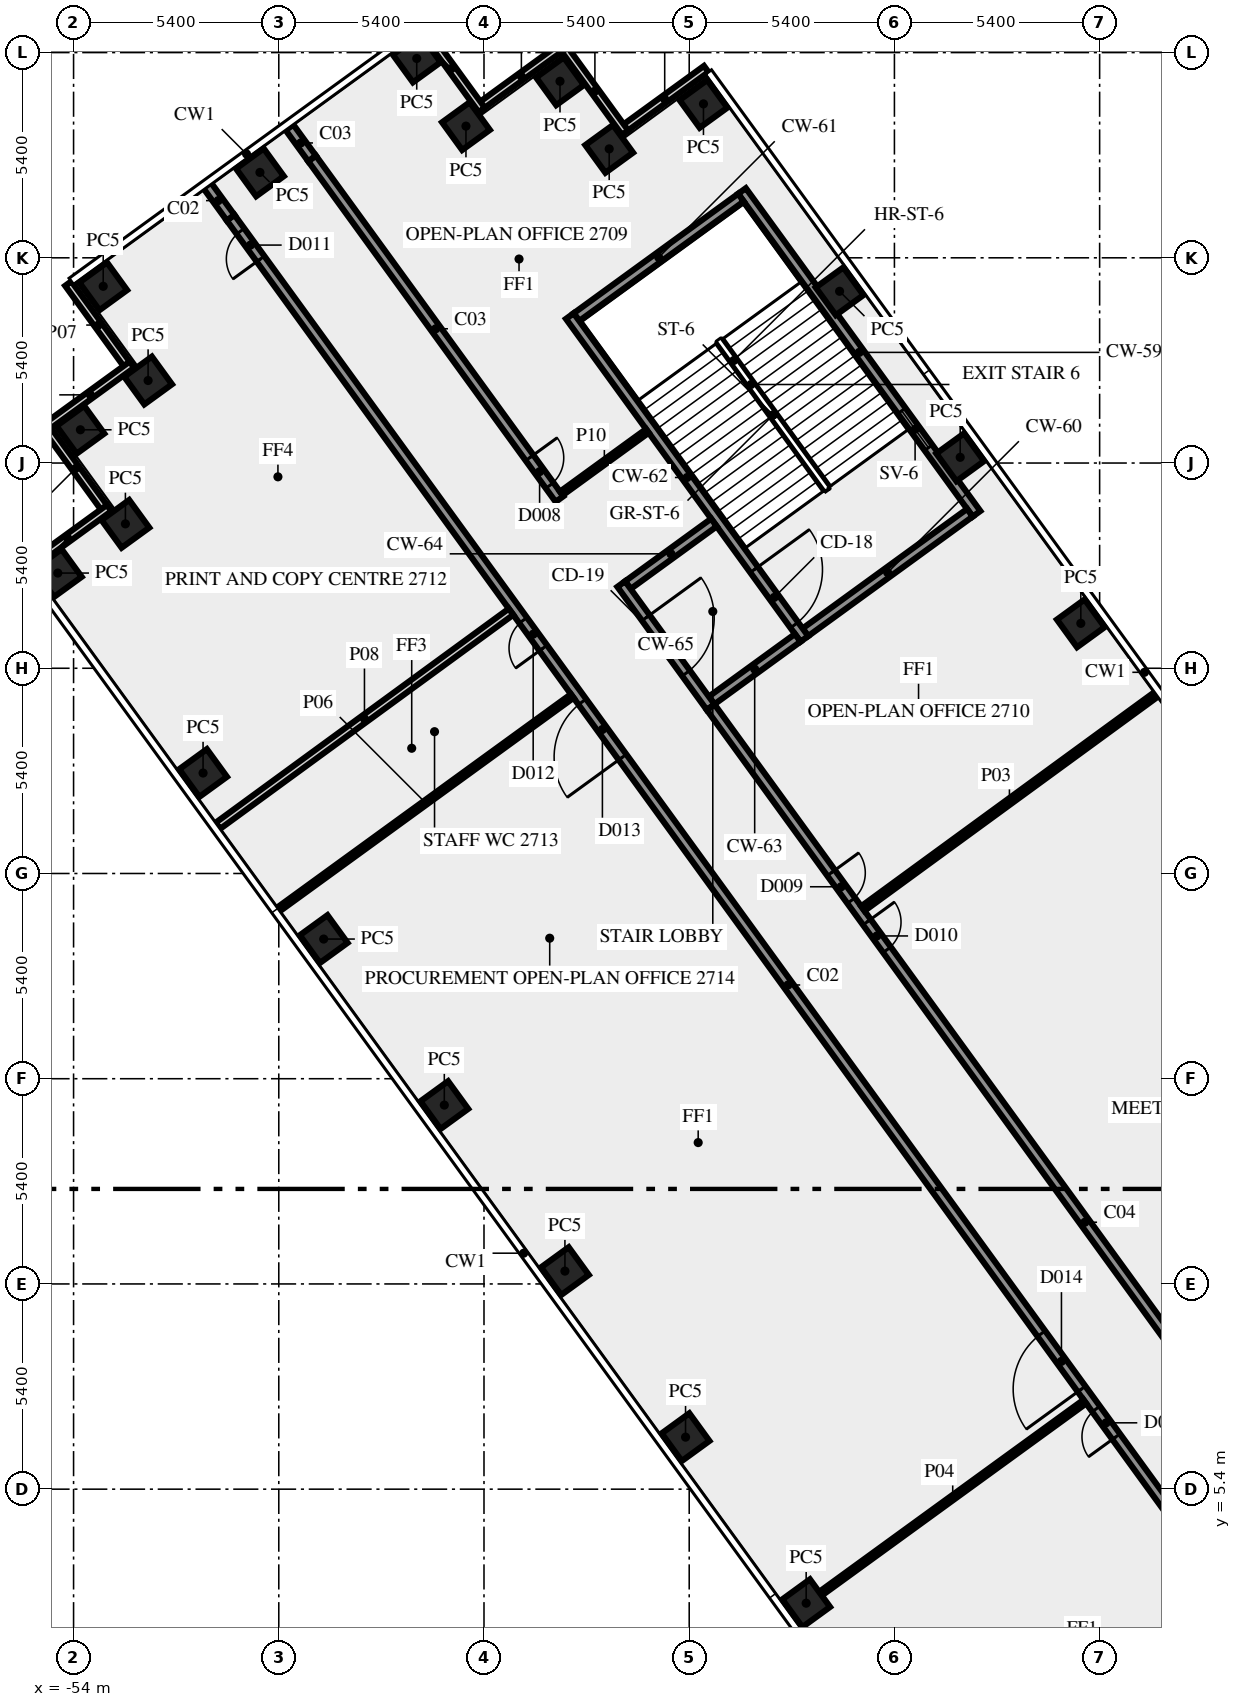
"""IFC4 building model, lengths in metres.
Left out: names, types, materials, properties, quantities, classifications, styles, units other than length and angle.
Written with IfcOpenShell. Run it as: python <this file> out.ifc"""

import sys

from ifc_helpers import new_model, si_unit, direction, frame, frame_2d, origin, origin_2d, place, context, subcontext, project, spatial, rectangle, extrude, element, fill, save


model = new_model("IFC4")
c1 = context("Model", 3, precision=1e-05, world=origin(), true_north=direction((0.0, 1.0)))
c2 = subcontext(c1, "Body", "Model", "MODEL_VIEW")
j1 = project(units=[si_unit("LENGTHUNIT", "METRE"), si_unit("PLANEANGLEUNIT", "RADIAN")], contexts=[c1])
p1 = place(None, origin())
s1 = spatial("IfcSite", under=j1, at=p1, CompositionType="ELEMENT")
p2 = place(p1, origin())
s2 = spatial("IfcBuilding", under=s1, at=p2, CompositionType="ELEMENT")
p3 = place(p2, frame((0.0, 0.0, 117.0)))
s3 = spatial("IfcBuildingStorey", under=s2, at=p3, CompositionType="ELEMENT", Elevation=117.0)
for number, where, z_axis, x_axis in (
    (1, (-27.495, 28.181, 0.0), (0.0, 0.0, 1.0), (-0.588, 0.809, 0.0)),
    (2, (-30.669, 32.55, 0.0), (0.0, 0.0, 1.0), (-0.588, 0.809, 0.0)),
    (3, (-33.843, 36.919, 0.0), (0.0, 0.0, 1.0), (-0.588, 0.809, 0.0)),
    (4, (-37.425, 41.85, 0.0), (0.0, 0.0, 1.0), (-0.588, 0.809, 0.0)),
    (5, (-39.906, 40.666, 0.0), (0.0, 0.0, 1.0), (-0.588, 0.809, 0.0)),
    (6, (-41.2, 42.445, 0.0), (0.0, 0.0, 1.0), (-0.588, 0.809, 0.0)),
    (7, (-43.675, 41.265, 0.0), (0.0, 0.0, 1.0), (-0.809, -0.588, 0.0)),
    (8, (-44.97, 43.045, 0.0), (0.0, 0.0, 1.0), (-0.809, -0.588, 0.0)),
    (9, (-49.096, 40.047, 0.0), (0.0, 0.0, 1.0), (-0.809, -0.588, 0.0)),
    (10, (-53.22, 37.05, 0.0), (0.0, 0.0, 1.0), (0.588, -0.809, 0.0)),
    (11, (-52.039, 34.571, 0.0), (0.0, 0.0, 1.0), (-0.809, -0.588, 0.0)),
    (12, (-53.82, 33.275, 0.0), (0.0, 0.0, 1.0), (0.588, -0.809, 0.0)),
    (13, (-52.636, 30.8, 0.0), (0.0, 0.0, 1.0), (-0.809, -0.588, 0.0)),
    (14, (-54.415, 29.505, 0.0), (0.0, 0.0, 1.0), (0.588, -0.809, 0.0)),
    (15, (-50.592, 24.243, 0.0), (0.0, 0.0, 1.0), (0.588, -0.809, 0.0)),
    (16, (-47.418, 19.875, 0.0), (0.0, 0.0, 1.0), (0.588, -0.809, 0.0)),
    (17, (-44.244, 15.506, 0.0), (0.0, 0.0, 1.0), (0.588, -0.809, 0.0)),
    (18, (-41.07, 11.137, 0.0), (0.0, 0.0, 1.0), (0.588, -0.809, 0.0)),
    (19, (-37.896, 6.769, 0.0), (0.0, 0.0, 1.0), (0.588, -0.809, 0.0)),
    (20, (-34.722, 2.4, 0.0), (0.0, 0.0, 1.0), (0.588, -0.809, 0.0)),
):
    element("IfcColumn", number, at=place(p3, frame(where, z_axis=z_axis, x_axis=x_axis)), inside=s3, PredefinedType="COLUMN", context=c2, shape_type="SweptSolid", body=[
        extrude(rectangle(XDim=0.9, YDim=0.9, at=origin_2d()), origin(), (0.0, 0.0, 1.0), 3.65),
    ])
p4 = place(p3, frame((-37.353, 42.768, 0.0), z_axis=(0.0, 0.0, 1.0), x_axis=(-0.809033161865, -0.587762999008, 0.0)))
e21 = element("IfcWall", 21, at=p4, inside=s3, PredefinedType="SOLIDWALL", context=c2, shape_type="SweptSolid", body=[
    extrude(rectangle(XDim=2.7, YDim=0.2, at=frame_2d((1.35, 0.0))), origin(), (0.0, 0.0, 1.0), 3.65),
])
p5 = place(p3, frame((-39.488, 41.094, 0.0), z_axis=(0.0, 0.0, 1.0), x_axis=(-0.587806000234, 0.809001919707, 0.0)))
e22 = element("IfcWall", 22, at=p5, inside=s3, PredefinedType="SOLIDWALL", context=c2, shape_type="SweptSolid", body=[
    extrude(rectangle(XDim=2.7, YDim=0.2, at=frame_2d((1.35, 0.0))), origin(), (0.0, 0.0, 1.0), 3.65),
])
for number, where, z_axis, x_axis in (
    (23, (-41.124, 43.366, 0.0), (0.0, 0.0, 1.0), (-0.809, -0.588, 0.0)),
    (24, (-43.259, 41.691, 0.0), (0.0, 0.0, 1.0), (-0.588, 0.809, 0.0)),
    (25, (-54.14, 37.123, 0.0), (0.0, 0.0, 1.0), (0.588, -0.809, 0.0)),
    (26, (-52.465, 34.987, 0.0), (0.0, 0.0, 1.0), (-0.809, -0.588, 0.0)),
):
    element("IfcWall", number, at=place(p3, frame(where, z_axis=z_axis, x_axis=x_axis)), inside=s3, PredefinedType="SOLIDWALL", context=c2, shape_type="SweptSolid", body=[
        extrude(rectangle(XDim=2.7, YDim=0.2, at=frame_2d((1.35, 0.0))), origin(), (0.0, 0.0, 1.0), 3.65),
    ])
p6 = place(p3, frame((-54.738, 33.351, 0.0), z_axis=(0.0, 0.0, 1.0), x_axis=(0.587779184282, -0.809021403008, 0.0)))
e27 = element("IfcWall", 27, at=p6, inside=s3, PredefinedType="SOLIDWALL", context=c2, shape_type="SweptSolid", body=[
    extrude(rectangle(XDim=2.7, YDim=0.2, at=frame_2d((1.35, 0.0))), origin(), (0.0, 0.0, 1.0), 3.65),
])
p7 = place(p3, frame((-53.063, 31.216, 0.0), z_axis=(0.0, 0.0, 1.0), x_axis=(-0.809033161865, -0.587762999008, 0.0)))
e28 = element("IfcWall", 28, at=p7, inside=s3, PredefinedType="SOLIDWALL", context=c2, shape_type="SweptSolid", body=[
    extrude(rectangle(XDim=2.7, YDim=0.2, at=frame_2d((1.35, 0.0))), origin(), (0.0, 0.0, 1.0), 3.65),
])
p8 = place(p3, frame((-30.24, 31.064, 0.0), z_axis=(0.0, 0.0, 1.0), x_axis=(-0.587795589702, 0.809009483706, 0.0)))
e29 = element("IfcWall", 29, at=p8, inside=s3, PredefinedType="SHEAR", context=c2, shape_type="SweptSolid", body=[
    extrude(rectangle(XDim=10.5, YDim=0.25, at=frame_2d((5.25, 0.0))), origin(), (0.0, 0.0, 1.0), 3.65),
])
p9 = place(p8, frame((2.15, 0.0, 1.0)))
e30 = element("IfcOpeningElement", 30, at=p9, cuts=e29, PredefinedType="OPENING", context=c2, shape_type="SweptSolid", body=[
    extrude(rectangle(XDim=1.2, YDim=1.2, at=frame_2d((0.6, 0.6))), frame((0.0, 0.135, 0.0), z_axis=(0.0, -1.0, 0.0), x_axis=(1.0, 0.0, 0.0)), (0.0, 0.0, 1.0), 0.27),
])
p10 = place(p3, frame((-30.414, 31.092, 0.0), z_axis=(0.0, 0.0, 1.0), x_axis=(-0.8089984606, -0.587810760999, 0.0)))
e31 = element("IfcWall", 31, at=p10, inside=s3, PredefinedType="SHEAR", context=c2, shape_type="SweptSolid", body=[
    extrude(rectangle(XDim=5.35, YDim=0.25, at=frame_2d((2.675, 0.0))), origin(), (0.0, 0.0, 1.0), 3.65),
])
p11 = place(p3, frame((-36.439, 39.384, 0.0), z_axis=(0.0, 0.0, 1.0), x_axis=(-0.809020161303, -0.587780893365, 0.0)))
e32 = element("IfcWall", 32, at=p11, inside=s3, PredefinedType="SHEAR", context=c2, shape_type="SweptSolid", body=[
    extrude(rectangle(XDim=5.35, YDim=0.25, at=frame_2d((2.675, 0.0))), origin(), (0.0, 0.0, 1.0), 3.65),
])
p12 = place(p3, frame((-40.942, 36.267, 0.0), z_axis=(0.0, 0.0, 1.0), x_axis=(0.587795589702, -0.809009483706, 0.0)))
e33 = element("IfcWall", 33, at=p12, inside=s3, PredefinedType="SHEAR", context=c2, shape_type="SweptSolid", body=[
    extrude(rectangle(XDim=10.5, YDim=0.25, at=frame_2d((5.25, 0.0))), origin(), (0.0, 0.0, 1.0), 3.65),
])
p13 = place(p12, frame((8.25, 0.0, 0.0)))
e34 = element("IfcOpeningElement", 34, at=p13, cuts=e33, PredefinedType="OPENING", context=c2, shape_type="SweptSolid", body=[
    extrude(rectangle(XDim=1.8, YDim=2.1, at=frame_2d((0.9, 1.05))), frame((0.0, 0.135, 0.0), z_axis=(0.0, -1.0, 0.0), x_axis=(1.0, 0.0, 0.0)), (0.0, 0.0, 1.0), 0.27),
])
for number, where, z_axis, x_axis in (
    (35, (-34.945, 27.8, 0.0), (0.0, 0.0, 1.0), (-0.809, -0.588, 0.0)),
    (36, (-37.149, 30.834, 0.0), (0.0, 0.0, 1.0), (-0.809, -0.588, 0.0)),
):
    element("IfcWall", number, at=place(p3, frame(where, z_axis=z_axis, x_axis=x_axis)), inside=s3, PredefinedType="SHEAR", context=c2, shape_type="SweptSolid", body=[
        extrude(rectangle(XDim=2.8, YDim=0.25, at=frame_2d((1.4, 0.0))), origin(), (0.0, 0.0, 1.0), 3.65),
    ])
p14 = place(p3, frame((-39.589, 29.216, 0.0), z_axis=(0.0, 0.0, 1.0), x_axis=(0.587772420479, -0.809026317077, 0.0)))
e37 = element("IfcWall", 37, at=p14, inside=s3, PredefinedType="SHEAR", context=c2, shape_type="SweptSolid", body=[
    extrude(rectangle(XDim=4.0, YDim=0.25, at=frame_2d((2.0, 0.0))), origin(), (0.0, 0.0, 1.0), 3.65),
])
p15 = place(p14, frame((1.1, 0.0, 0.0)))
e38 = element("IfcOpeningElement", 38, at=p15, cuts=e37, PredefinedType="OPENING", context=c2, shape_type="SweptSolid", body=[
    extrude(rectangle(XDim=1.8, YDim=2.1, at=frame_2d((0.9, 1.05))), frame((0.0, 0.135, 0.0), z_axis=(0.0, -1.0, 0.0), x_axis=(1.0, 0.0, 0.0)), (0.0, 0.0, 1.0), 0.27),
])
p16 = place(p3, frame((-20.531, -1.523, 0.0), z_axis=(0.0, 0.0, 1.0), x_axis=(-0.587784522481, 0.809017524614, 0.0)))
e39 = element("IfcWall", 39, at=p16, inside=s3, PredefinedType="SOLIDWALL", context=c2, shape_type="SweptSolid", body=[
    extrude(rectangle(XDim=49.912, YDim=0.25, at=frame_2d((24.956, 0.0))), origin(), (0.0, 0.0, 1.0), 3.65),
])
p17 = place(p16, frame((10.266, 0.0, 0.0)))
e40 = element("IfcOpeningElement", 40, at=p17, cuts=e39, PredefinedType="OPENING", context=c2, shape_type="SweptSolid", body=[
    extrude(rectangle(XDim=0.9, YDim=2.1, at=frame_2d((0.45, 1.05))), frame((0.0, 0.135, 0.0), z_axis=(0.0, -1.0, 0.0), x_axis=(1.0, 0.0, 0.0)), (0.0, 0.0, 1.0), 0.27),
])
p18 = place(p16, frame((32.366, 0.0, 0.0)))
e41 = element("IfcOpeningElement", 41, at=p18, cuts=e39, PredefinedType="OPENING", context=c2, shape_type="SweptSolid", body=[
    extrude(rectangle(XDim=1.8, YDim=2.1, at=frame_2d((0.9, 1.05))), frame((0.0, 0.135, 0.0), z_axis=(0.0, -1.0, 0.0), x_axis=(1.0, 0.0, 0.0)), (0.0, 0.0, 1.0), 0.27),
])
p19 = place(p16, frame((11.815, 0.0, 0.0)))
e42 = element("IfcOpeningElement", 42, at=p19, cuts=e39, PredefinedType="OPENING", context=c2, shape_type="SweptSolid", body=[
    extrude(rectangle(XDim=1.8, YDim=2.1, at=frame_2d((0.9, 1.05))), frame((0.0, 0.135, 0.0), z_axis=(0.0, -1.0, 0.0), x_axis=(1.0, 0.0, 0.0)), (0.0, 0.0, 1.0), 0.27),
])
p20 = place(p16, frame((48.57, 0.0, 0.0)))
e43 = element("IfcOpeningElement", 43, at=p20, cuts=e39, PredefinedType="OPENING", context=c2, shape_type="SweptSolid", body=[
    extrude(rectangle(XDim=0.9, YDim=2.1, at=frame_2d((0.45, 1.05))), frame((0.0, 0.135, 0.0), z_axis=(0.0, -1.0, 0.0), x_axis=(1.0, 0.0, 0.0)), (0.0, 0.0, 1.0), 0.27),
])
p21 = place(p16, frame((35.915, 0.0, 0.0)))
e44 = element("IfcOpeningElement", 44, at=p21, cuts=e39, PredefinedType="OPENING", context=c2, shape_type="SweptSolid", body=[
    extrude(rectangle(XDim=0.9, YDim=2.1, at=frame_2d((0.45, 1.05))), frame((0.0, 0.135, 0.0), z_axis=(0.0, -1.0, 0.0), x_axis=(1.0, 0.0, 0.0)), (0.0, 0.0, 1.0), 0.27),
])
p22 = place(p3, frame((-47.725, 40.414, 0.0), z_axis=(0.0, 0.0, 1.0), x_axis=(0.587773291021, -0.809025684612, 0.0)))
e45 = element("IfcWall", 45, at=p22, inside=s3, PredefinedType="SOLIDWALL", context=c2, shape_type="SweptSolid", body=[
    extrude(rectangle(XDim=11.079, YDim=0.25, at=frame_2d((5.539, 0.0))), origin(), (0.0, 0.0, 1.0), 3.65),
])
p23 = place(p22, frame((9.737, 0.0, 0.0)))
e46 = element("IfcOpeningElement", 46, at=p23, cuts=e45, PredefinedType="OPENING", context=c2, shape_type="SweptSolid", body=[
    extrude(rectangle(XDim=0.9, YDim=2.1, at=frame_2d((0.45, 1.05))), frame((0.0, 0.135, 0.0), z_axis=(0.0, -1.0, 0.0), x_axis=(1.0, 0.0, 0.0)), (0.0, 0.0, 1.0), 0.27),
])
p24 = place(p3, frame((-37.232, 25.972, 0.0), z_axis=(0.0, 0.0, 1.0), x_axis=(0.587786323093, -0.809016216391, 0.0)))
e47 = element("IfcWall", 47, at=p24, inside=s3, PredefinedType="SOLIDWALL", context=c2, shape_type="SweptSolid", body=[
    extrude(rectangle(XDim=33.493, YDim=0.25, at=frame_2d((16.747, 0.0))), origin(), (0.0, 0.0, 1.0), 3.65),
])
p25 = place(p24, frame((5.385, 0.0, 0.0)))
e48 = element("IfcOpeningElement", 48, at=p25, cuts=e47, PredefinedType="OPENING", context=c2, shape_type="SweptSolid", body=[
    extrude(rectangle(XDim=0.9, YDim=2.1, at=frame_2d((0.45, 1.05))), frame((0.0, 0.135, 0.0), z_axis=(0.0, -1.0, 0.0), x_axis=(1.0, 0.0, 0.0)), (0.0, 0.0, 1.0), 0.27),
])
p26 = place(p24, frame((6.985, 0.0, 0.0)))
e49 = element("IfcOpeningElement", 49, at=p26, cuts=e47, PredefinedType="OPENING", context=c2, shape_type="SweptSolid", body=[
    extrude(rectangle(XDim=0.9, YDim=2.1, at=frame_2d((0.45, 1.05))), frame((0.0, 0.135, 0.0), z_axis=(0.0, -1.0, 0.0), x_axis=(1.0, 0.0, 0.0)), (0.0, 0.0, 1.0), 0.27),
])
p27 = place(p3, frame((-33.23, 20.677, 0.0), z_axis=(0.0, 0.0, 1.0), x_axis=(0.807610282865, 0.589716568371, 0.0)))
e50 = element("IfcWall", 50, at=p27, inside=s3, PredefinedType="PARTITIONING", context=c2, shape_type="SweptSolid", body=[
    extrude(rectangle(XDim=9.55, YDim=0.15, at=frame_2d((4.775, 0.0))), origin(), (0.0, 0.0, 1.0), 2.75),
])
p28 = place(p3, frame((-27.389, 7.703, 0.0), z_axis=(0.0, 0.0, 1.0), x_axis=(-0.809052894195, -0.587735837256, 0.0)))
e51 = element("IfcWall", 51, at=p28, inside=s3, PredefinedType="PARTITIONING", context=c2, shape_type="SweptSolid", body=[
    extrude(rectangle(XDim=8.594, YDim=0.12, at=frame_2d((4.297, 0.0))), origin(), (0.0, 0.0, 1.0), 3.65),
])
p29 = place(p3, frame((-40.878, 26.27, 0.0), z_axis=(0.0, 0.0, 1.0), x_axis=(-0.809102944047, -0.587666934526, 0.0)))
e52 = element("IfcWall", 52, at=p29, inside=s3, PredefinedType="PARTITIONING", context=c2, shape_type="SweptSolid", body=[
    extrude(rectangle(XDim=9.55, YDim=0.12, at=frame_2d((4.775, 0.0))), origin(), (0.0, 0.0, 1.0), 2.75),
])
p30 = place(p3, frame((-50.202, 22.855, 0.0), z_axis=(0.0, 0.0, 1.0), x_axis=(0.807642555839, 0.589672368352, 0.0)))
e53 = element("IfcWall", 53, at=p30, inside=s3, PredefinedType="SOLIDWALL", context=c2, shape_type="SweptSolid", body=[
    extrude(rectangle(XDim=9.551, YDim=0.2, at=frame_2d((4.775, 0.0))), origin(), (0.0, 0.0, 1.0), 2.75),
])
p31 = place(p3, frame((-41.166, 31.599, 0.0), z_axis=(0.0, 0.0, 1.0), x_axis=(0.809090262332, 0.587684394381, 0.0)))
e54 = element("IfcWall", 54, at=p31, inside=s3, PredefinedType="PARTITIONING", context=c2, shape_type="SweptSolid", body=[
    extrude(rectangle(XDim=2.801, YDim=0.12, at=frame_2d((1.4, 0.0))), origin(), (0.0, 0.0, 1.0), 3.65),
])
p32 = place(p3, frame((-49.869, 38.856, 0.0), z_axis=(0.0, 0.0, 1.0), x_axis=(-0.587674273289, 0.809097613712, 0.0)))
e55 = element("IfcWall", 55, at=p32, inside=s3, PredefinedType="SOLIDWALL", context=c2, shape_type="SweptSolid", body=[
    extrude(rectangle(XDim=1.109, YDim=0.25, at=frame_2d((0.555, 0.0))), origin(), (0.0, 0.0, 1.0), 2.75),
])
p33 = place(p3, frame((-47.725, 40.414, 0.0), z_axis=(0.0, 0.0, 1.0), x_axis=(-0.587840411638, 0.808976915892, 0.0)))
e56 = element("IfcWall", 56, at=p33, inside=s3, PredefinedType="SOLIDWALL", context=c2, shape_type="SweptSolid", body=[
    extrude(rectangle(XDim=1.008, YDim=0.25, at=frame_2d((0.504, 0.0))), origin(), (0.0, 0.0, 1.0), 2.75),
])
p34 = place(p9, origin())
e57 = element("IfcWindow", 57, at=p34, inside=s3, PartitioningType="SINGLE_PANEL", PredefinedType="WINDOW", context=c2, shape_type="SweptSolid", body=[
    extrude(rectangle(XDim=1.2, YDim=1.2, at=frame_2d((0.6, 0.6))), frame((0.0, 0.03, 0.0), z_axis=(0.0, -1.0, 0.0), x_axis=(1.0, 0.0, 0.0)), (0.0, 0.0, 1.0), 0.06),
])
fill(e30, e57)
p35 = place(p13, origin())
e58 = element("IfcDoor", 58, at=p35, inside=s3, OperationType="DOUBLE_DOOR_SINGLE_SWING", PredefinedType="DOOR", context=c2, shape_type="SweptSolid", body=[
    extrude(rectangle(XDim=1.8, YDim=2.1, at=frame_2d((0.9, 1.05))), frame((0.0, 0.025, 0.0), z_axis=(0.0, -1.0, 0.0), x_axis=(1.0, 0.0, 0.0)), (0.0, 0.0, 1.0), 0.05),
])
fill(e34, e58)
p36 = place(p15, origin())
e59 = element("IfcDoor", 59, at=p36, inside=s3, OperationType="DOUBLE_DOOR_SINGLE_SWING", PredefinedType="DOOR", context=c2, shape_type="SweptSolid", body=[
    extrude(rectangle(XDim=1.8, YDim=2.1, at=frame_2d((0.9, 1.05))), frame((0.0, 0.025, 0.0), z_axis=(0.0, -1.0, 0.0), x_axis=(1.0, 0.0, 0.0)), (0.0, 0.0, 1.0), 0.05),
])
fill(e38, e59)
p37 = place(p23, origin())
e60 = element("IfcDoor", 60, at=p37, inside=s3, OperationType="SINGLE_SWING_RIGHT", PredefinedType="DOOR", context=c2, shape_type="SweptSolid", body=[
    extrude(rectangle(XDim=0.9, YDim=2.1, at=frame_2d((0.45, 1.05))), frame((0.0, 0.025, 0.0), z_axis=(0.0, -1.0, 0.0), x_axis=(1.0, 0.0, 0.0)), (0.0, 0.0, 1.0), 0.05),
])
fill(e46, e60)
p38 = place(p25, origin())
e61 = element("IfcDoor", 61, at=p38, inside=s3, OperationType="SINGLE_SWING_RIGHT", PredefinedType="DOOR", context=c2, shape_type="SweptSolid", body=[
    extrude(rectangle(XDim=0.9, YDim=2.1, at=frame_2d((0.45, 1.05))), frame((0.0, 0.025, 0.0), z_axis=(0.0, -1.0, 0.0), x_axis=(1.0, 0.0, 0.0)), (0.0, 0.0, 1.0), 0.05),
])
fill(e48, e61)
p39 = place(p17, origin())
e62 = element("IfcDoor", 62, at=p39, inside=s3, OperationType="SINGLE_SWING_RIGHT", PredefinedType="DOOR", context=c2, shape_type="SweptSolid", body=[
    extrude(rectangle(XDim=0.9, YDim=2.1, at=frame_2d((0.45, 1.05))), frame((0.0, 0.025, 0.0), z_axis=(0.0, -1.0, 0.0), x_axis=(1.0, 0.0, 0.0)), (0.0, 0.0, 1.0), 0.05),
])
fill(e40, e62)
p40 = place(p26, origin())
e63 = element("IfcDoor", 63, at=p40, inside=s3, OperationType="SINGLE_SWING_LEFT", PredefinedType="DOOR", context=c2, shape_type="SweptSolid", body=[
    extrude(rectangle(XDim=0.9, YDim=2.1, at=frame_2d((0.45, 1.05))), frame((0.0, 0.025, 0.0), z_axis=(0.0, -1.0, 0.0), x_axis=(1.0, 0.0, 0.0)), (0.0, 0.0, 1.0), 0.05),
])
fill(e49, e63)
p41 = place(p18, origin())
e64 = element("IfcDoor", 64, at=p41, inside=s3, OperationType="DOUBLE_DOOR_SINGLE_SWING", PredefinedType="DOOR", context=c2, shape_type="SweptSolid", body=[
    extrude(rectangle(XDim=1.8, YDim=2.1, at=frame_2d((0.9, 1.05))), frame((0.0, 0.025, 0.0), z_axis=(0.0, -1.0, 0.0), x_axis=(1.0, 0.0, 0.0)), (0.0, 0.0, 1.0), 0.05),
])
fill(e41, e64)
p42 = place(p19, origin())
e65 = element("IfcDoor", 65, at=p42, inside=s3, OperationType="DOUBLE_DOOR_SINGLE_SWING", PredefinedType="DOOR", context=c2, shape_type="SweptSolid", body=[
    extrude(rectangle(XDim=1.8, YDim=2.1, at=frame_2d((0.9, 1.05))), frame((0.0, 0.025, 0.0), z_axis=(0.0, -1.0, 0.0), x_axis=(1.0, 0.0, 0.0)), (0.0, 0.0, 1.0), 0.05),
])
fill(e42, e65)
p43 = place(p20, origin())
e66 = element("IfcDoor", 66, at=p43, inside=s3, OperationType="SINGLE_SWING_RIGHT", PredefinedType="DOOR", context=c2, shape_type="SweptSolid", body=[
    extrude(rectangle(XDim=0.9, YDim=2.1, at=frame_2d((0.45, 1.05))), frame((0.0, 0.025, 0.0), z_axis=(0.0, -1.0, 0.0), x_axis=(1.0, 0.0, 0.0)), (0.0, 0.0, 1.0), 0.05),
])
fill(e43, e66)
p44 = place(p21, origin())
e67 = element("IfcDoor", 67, at=p44, inside=s3, OperationType="SINGLE_SWING_RIGHT", PredefinedType="DOOR", context=c2, shape_type="SweptSolid", body=[
    extrude(rectangle(XDim=0.9, YDim=2.1, at=frame_2d((0.45, 1.05))), frame((0.0, 0.025, 0.0), z_axis=(0.0, -1.0, 0.0), x_axis=(1.0, 0.0, 0.0)), (0.0, 0.0, 1.0), 0.05),
])
fill(e44, e67)
save(model, sys.argv[1])
